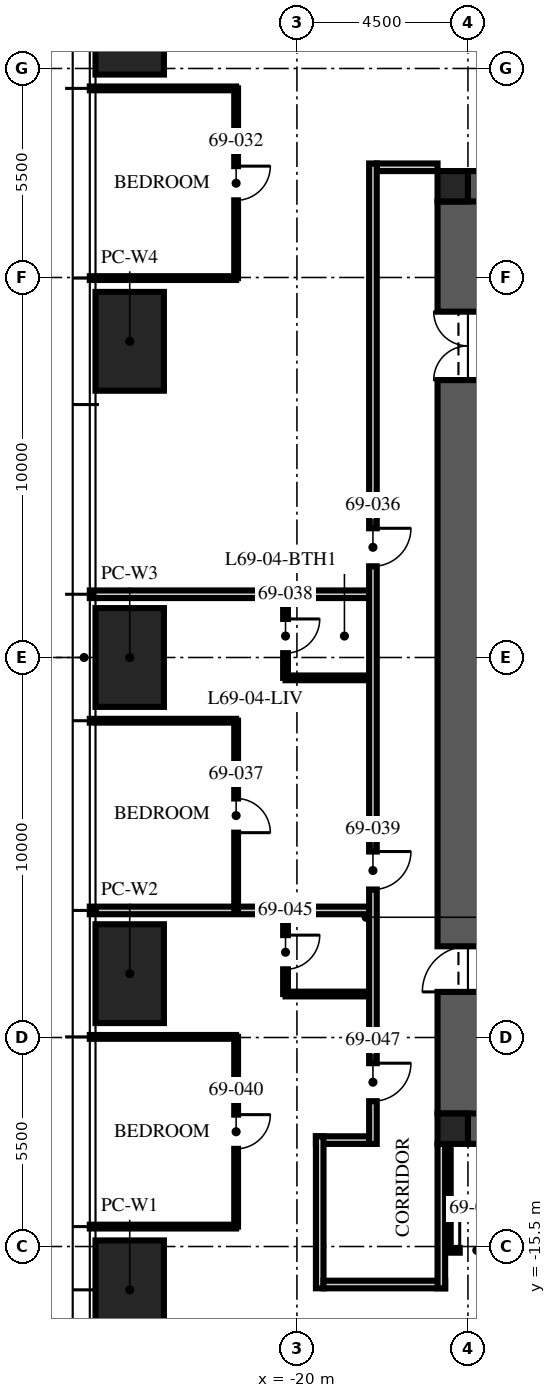
"""IFC4 building model, lengths in metres.
Left out: names, types, materials, properties, quantities, classifications, styles, units other than length and angle.
Written with IfcOpenShell. Run it as: python <this file> out.ifc"""

import sys

from ifc_helpers import new_model, si_unit, direction, frame, frame_2d, origin, origin_2d, place, context, subcontext, project, spatial, rectangle, hollow_rectangle, extrude, element, fill, save


model = new_model("IFC4")
c1 = context("Model", 3, precision=1e-05, world=origin(), true_north=direction((0.0, 1.0)))
c2 = subcontext(c1, "Body", "Model", "MODEL_VIEW")
j1 = project(units=[si_unit("LENGTHUNIT", "METRE"), si_unit("PLANEANGLEUNIT", "RADIAN")], contexts=[c1])
p1 = place(None, origin())
s1 = spatial("IfcSite", under=j1, at=p1, CompositionType="ELEMENT")
p2 = place(p1, origin())
s2 = spatial("IfcBuilding", under=s1, at=p2, CompositionType="ELEMENT")
p3 = place(p2, frame((0.0, 0.0, 274.5)))
s3 = spatial("IfcBuildingStorey", under=s2, at=p3, CompositionType="ELEMENT", Elevation=274.5)
for number, where, z_axis, x_axis in (
    (1, (-15.5, 12.0, -0.25), (0.0, 0.0, 1.0), (1.0, 0.0, 0.0)),
    (2, (-15.5, -12.0, -0.25), (0.0, 0.0, 1.0), (1.0, 0.0, 0.0)),
):
    element("IfcWall", number, at=place(p3, frame(where, z_axis=z_axis, x_axis=x_axis)), inside=s3, PredefinedType="SHEAR", context=c2, shape_type="SweptSolid", body=[
        extrude(rectangle(XDim=31.0, YDim=1.6, at=frame_2d((15.5, 0.0))), origin(), (0.0, 0.0, 1.0), 3.65),
    ])
p4 = place(p3, frame((-15.5, -12.0, -0.25), z_axis=(0.0, 0.0, 1.0), x_axis=(0.0, 1.0, 0.0)))
e3 = element("IfcWall", 3, at=p4, inside=s3, PredefinedType="SHEAR", context=c2, shape_type="SweptSolid", body=[
    extrude(rectangle(XDim=24.0, YDim=1.6, at=frame_2d((12.0, 0.0))), origin(), (0.0, 0.0, 1.0), 3.65),
])
p5 = place(p4, frame((3.2, 0.0, 0.25)))
e4 = element("IfcOpeningElement", 4, at=p5, cuts=e3, PredefinedType="OPENING", context=c2, shape_type="SweptSolid", body=[
    extrude(rectangle(XDim=1.2, YDim=2.1, at=frame_2d((0.6, 1.05))), frame((0.0, 0.81, 0.0), z_axis=(0.0, -1.0, 0.0), x_axis=(1.0, 0.0, 0.0)), (0.0, 0.0, 1.0), 1.62),
])
p6 = place(p4, frame((19.3, 0.0, 0.25)))
e5 = element("IfcOpeningElement", 5, at=p6, cuts=e3, PredefinedType="OPENING", context=c2, shape_type="SweptSolid", body=[
    extrude(rectangle(XDim=1.8, YDim=2.1, at=frame_2d((0.9, 1.05))), frame((0.0, 0.81, 0.0), z_axis=(0.0, -1.0, 0.0), x_axis=(1.0, 0.0, 0.0)), (0.0, 0.0, 1.0), 1.62),
])
for number, where, z_axis, x_axis in (
    (6, (-15.9, 12.4, -0.25), (0.0, 0.0, 1.0), (1.0, 0.0, 0.0)),
    (7, (-15.9, -12.4, -0.25), (0.0, 0.0, 1.0), (1.0, 0.0, 0.0)),
):
    element("IfcColumn", number, at=place(p3, frame(where, z_axis=z_axis, x_axis=x_axis)), inside=s3, PredefinedType="COLUMN", context=c2, shape_type="SweptSolid", body=[
        extrude(rectangle(XDim=0.8, YDim=0.8, at=origin_2d()), origin(), (0.0, 0.0, 1.0), 3.65),
    ])
p7 = place(p3, frame((-24.4, -16.64, 0.0), z_axis=(0.0, 0.0, 1.0), x_axis=(0.0, 1.0, 0.0)))
e8 = element("IfcColumn", 8, at=p7, inside=s3, PredefinedType="COLUMN", context=c2, shape_type="SweptSolid", body=[
    extrude(hollow_rectangle(XDim=2.6, YDim=1.8, WallThickness=0.14, at=origin_2d()), origin(), (0.0, 0.0, 1.0), 2.51),
])
p8 = place(p3, frame((-24.4, -8.32, 0.0), z_axis=(0.0, 0.0, 1.0), x_axis=(0.0, 1.0, 0.0)))
e9 = element("IfcColumn", 9, at=p8, inside=s3, PredefinedType="COLUMN", context=c2, shape_type="SweptSolid", body=[
    extrude(hollow_rectangle(XDim=2.6, YDim=1.8, WallThickness=0.14, at=origin_2d()), origin(), (0.0, 0.0, 1.0), 2.64),
])
p9 = place(p3, frame((-24.4, 0.0, 0.0), z_axis=(0.0, 0.0, 1.0), x_axis=(0.0, 1.0, 0.0)))
e10 = element("IfcColumn", 10, at=p9, inside=s3, PredefinedType="COLUMN", context=c2, shape_type="SweptSolid", body=[
    extrude(hollow_rectangle(XDim=2.6, YDim=1.8, WallThickness=0.14, at=origin_2d()), origin(), (0.0, 0.0, 1.0), 2.78),
])
p10 = place(p3, frame((-24.4, 8.32, 0.0), z_axis=(0.0, 0.0, 1.0), x_axis=(0.0, 1.0, 0.0)))
e11 = element("IfcColumn", 11, at=p10, inside=s3, PredefinedType="COLUMN", context=c2, shape_type="SweptSolid", body=[
    extrude(hollow_rectangle(XDim=2.6, YDim=1.8, WallThickness=0.14, at=origin_2d()), origin(), (0.0, 0.0, 1.0), 2.64),
])
p11 = place(p3, frame((-24.4, 16.64, 0.0), z_axis=(0.0, 0.0, 1.0), x_axis=(0.0, 1.0, 0.0)))
e12 = element("IfcColumn", 12, at=p11, inside=s3, PredefinedType="COLUMN", context=c2, shape_type="SweptSolid", body=[
    extrude(hollow_rectangle(XDim=2.6, YDim=1.8, WallThickness=0.14, at=origin_2d()), origin(), (0.0, 0.0, 1.0), 2.51),
])
p12 = place(p3, frame((-18.1, -12.7, 0.0), z_axis=(0.0, 0.0, 1.0), x_axis=(-1.0, 0.0, 0.0)))
e13 = element("IfcWall", 13, at=p12, inside=s3, PredefinedType="PARTITIONING", context=c2, shape_type="SweptSolid", body=[
    extrude(rectangle(XDim=1.4, YDim=0.2, at=frame_2d((0.7, 0.0))), origin(), (0.0, 0.0, 1.0), 2.2),
])
p13 = place(p3, frame((-19.4, -12.6, 0.0), z_axis=(0.0, 0.0, 1.0), x_axis=(0.0, -1.0, 0.0)))
e14 = element("IfcWall", 14, at=p13, inside=s3, PredefinedType="PARTITIONING", context=c2, shape_type="SweptSolid", body=[
    extrude(rectangle(XDim=4.0, YDim=0.2, at=frame_2d((2.0, 0.0))), origin(), (0.0, 0.0, 1.0), 2.2),
])
p14 = place(p3, frame((-19.3, -16.5, 0.0), z_axis=(0.0, 0.0, 1.0), x_axis=(1.0, 0.0, 0.0)))
e15 = element("IfcWall", 15, at=p14, inside=s3, PredefinedType="PARTITIONING", context=c2, shape_type="SweptSolid", body=[
    extrude(rectangle(XDim=3.2, YDim=0.2, at=frame_2d((1.6, 0.0))), origin(), (0.0, 0.0, 1.0), 2.2),
])
p15 = place(p3, frame((-16.2, -16.6, 0.0), z_axis=(0.0, 0.0, 1.0), x_axis=(0.0, 1.0, 0.0)))
e16 = element("IfcWall", 16, at=p15, inside=s3, PredefinedType="PARTITIONING", context=c2, shape_type="SweptSolid", body=[
    extrude(rectangle(XDim=3.8, YDim=0.2, at=frame_2d((1.9, 0.0))), origin(), (0.0, 0.0, 1.0), 2.2),
])
p16 = place(p3, frame((-16.3, 12.9, 0.0), z_axis=(0.0, 0.0, 1.0), x_axis=(-1.0, 0.0, 0.0)))
e17 = element("IfcWall", 17, at=p16, inside=s3, PredefinedType="PARTITIONING", context=c2, shape_type="SweptSolid", body=[
    extrude(rectangle(XDim=1.6, YDim=0.2, at=frame_2d((0.8, 0.0))), origin(), (0.0, 0.0, 1.0), 2.2),
])
for number, where, z_axis, x_axis in (
    (18, (-21.6, 14.976, 0.0), (0.0, 0.0, 1.0), (-1.0, 0.0, 0.0)),
    (19, (-21.6, 9.984, 0.0), (0.0, 0.0, 1.0), (-1.0, 0.0, 0.0)),
):
    element("IfcWall", number, at=place(p3, frame(where, z_axis=z_axis, x_axis=x_axis)), inside=s3, PredefinedType="PARTITIONING", context=c2, shape_type="SweptSolid", body=[
        extrude(rectangle(XDim=3.85, YDim=0.1, at=frame_2d((1.925, 0.0))), origin(), (0.0, 0.0, 1.0), 2.75),
    ])
p17 = place(p3, frame((-18.1, 1.664, 0.0), z_axis=(0.0, 0.0, 1.0), x_axis=(-1.0, 0.0, 0.0)))
e20 = element("IfcWall", 20, at=p17, inside=s3, PredefinedType="PARTITIONING", context=c2, shape_type="SweptSolid", body=[
    extrude(rectangle(XDim=7.35, YDim=0.2, at=frame_2d((3.675, 0.0))), origin(), (0.0, 0.0, 1.0), 2.75),
])
p18 = place(p3, frame((-21.6, -1.664, 0.0), z_axis=(0.0, 0.0, 1.0), x_axis=(-1.0, 0.0, 0.0)))
e21 = element("IfcWall", 21, at=p18, inside=s3, PredefinedType="PARTITIONING", context=c2, shape_type="SweptSolid", body=[
    extrude(rectangle(XDim=3.85, YDim=0.1, at=frame_2d((1.925, 0.0))), origin(), (0.0, 0.0, 1.0), 2.75),
])
p19 = place(p3, frame((-18.1, -6.656, 0.0), z_axis=(0.0, 0.0, 1.0), x_axis=(-1.0, 0.0, 0.0)))
e22 = element("IfcWall", 22, at=p19, inside=s3, PredefinedType="PARTITIONING", context=c2, shape_type="SweptSolid", body=[
    extrude(rectangle(XDim=7.35, YDim=0.2, at=frame_2d((3.675, 0.0))), origin(), (0.0, 0.0, 1.0), 2.75),
])
for number, where, z_axis, x_axis in (
    (23, (-21.6, -9.984, 0.0), (0.0, 0.0, 1.0), (-1.0, 0.0, 0.0)),
    (24, (-21.6, -14.976, 0.0), (0.0, 0.0, 1.0), (-1.0, 0.0, 0.0)),
):
    element("IfcWall", number, at=place(p3, frame(where, z_axis=z_axis, x_axis=x_axis)), inside=s3, PredefinedType="PARTITIONING", context=c2, shape_type="SweptSolid", body=[
        extrude(rectangle(XDim=3.85, YDim=0.1, at=frame_2d((1.925, 0.0))), origin(), (0.0, 0.0, 1.0), 2.75),
    ])
p20 = place(p3, frame((-21.6, 14.976, 0.0), z_axis=(0.0, 0.0, 1.0), x_axis=(0.0, -1.0, 0.0)))
e25 = element("IfcWall", 25, at=p20, inside=s3, PredefinedType="PARTITIONING", context=c2, shape_type="SweptSolid", body=[
    extrude(rectangle(XDim=4.992, YDim=0.1, at=frame_2d((2.496, 0.0))), origin(), (0.0, 0.0, 1.0), 2.2),
])
p21 = place(p20, frame((2.046, 0.0, 0.0)))
e26 = element("IfcOpeningElement", 26, at=p21, cuts=e25, PredefinedType="OPENING", context=c2, shape_type="SweptSolid", body=[
    extrude(rectangle(XDim=0.9, YDim=2.1, at=frame_2d((0.45, 1.05))), frame((0.0, 0.06, 0.0), z_axis=(0.0, -1.0, 0.0), x_axis=(1.0, 0.0, 0.0)), (0.0, 0.0, 1.0), 0.12),
])
p22 = place(p3, frame((-21.6, -1.664, 0.0), z_axis=(0.0, 0.0, 1.0), x_axis=(0.0, -1.0, 0.0)))
e27 = element("IfcWall", 27, at=p22, inside=s3, PredefinedType="PARTITIONING", context=c2, shape_type="SweptSolid", body=[
    extrude(rectangle(XDim=4.992, YDim=0.1, at=frame_2d((2.496, 0.0))), origin(), (0.0, 0.0, 1.0), 2.2),
])
p23 = place(p22, frame((2.046, 0.0, 0.0)))
e28 = element("IfcOpeningElement", 28, at=p23, cuts=e27, PredefinedType="OPENING", context=c2, shape_type="SweptSolid", body=[
    extrude(rectangle(XDim=0.9, YDim=2.1, at=frame_2d((0.45, 1.05))), frame((0.0, 0.06, 0.0), z_axis=(0.0, -1.0, 0.0), x_axis=(1.0, 0.0, 0.0)), (0.0, 0.0, 1.0), 0.12),
])
p24 = place(p3, frame((-20.3, 1.664, 0.0), z_axis=(0.0, 0.0, 1.0), x_axis=(0.0, -1.0, 0.0)))
e29 = element("IfcWall", 29, at=p24, inside=s3, PredefinedType="PARTITIONING", context=c2, shape_type="SweptSolid", body=[
    extrude(rectangle(XDim=2.2, YDim=0.125, at=frame_2d((1.1, 0.0))), origin(), (0.0, 0.0, 1.0), 2.2),
])
p25 = place(p24, frame((0.65, 0.0, 0.0)))
e30 = element("IfcOpeningElement", 30, at=p25, cuts=e29, PredefinedType="OPENING", context=c2, shape_type="SweptSolid", body=[
    extrude(rectangle(XDim=0.9, YDim=2.1, at=frame_2d((0.45, 1.05))), frame((0.0, 0.073, 0.0), z_axis=(0.0, -1.0, 0.0), x_axis=(1.0, 0.0, 0.0)), (0.0, 0.0, 1.0), 0.145),
])
p26 = place(p3, frame((-18.1, -0.536, 0.0), z_axis=(0.0, 0.0, 1.0), x_axis=(-1.0, 0.0, 0.0)))
e31 = element("IfcWall", 31, at=p26, inside=s3, PredefinedType="PARTITIONING", context=c2, shape_type="SweptSolid", body=[
    extrude(rectangle(XDim=2.2, YDim=0.125, at=frame_2d((1.1, 0.0))), origin(), (0.0, 0.0, 1.0), 2.2),
])
p27 = place(p3, frame((-21.6, -9.984, 0.0), z_axis=(0.0, 0.0, 1.0), x_axis=(0.0, -1.0, 0.0)))
e32 = element("IfcWall", 32, at=p27, inside=s3, PredefinedType="PARTITIONING", context=c2, shape_type="SweptSolid", body=[
    extrude(rectangle(XDim=4.992, YDim=0.1, at=frame_2d((2.496, 0.0))), origin(), (0.0, 0.0, 1.0), 2.2),
])
p28 = place(p27, frame((2.046, 0.0, 0.0)))
e33 = element("IfcOpeningElement", 33, at=p28, cuts=e32, PredefinedType="OPENING", context=c2, shape_type="SweptSolid", body=[
    extrude(rectangle(XDim=0.9, YDim=2.1, at=frame_2d((0.45, 1.05))), frame((0.0, 0.06, 0.0), z_axis=(0.0, -1.0, 0.0), x_axis=(1.0, 0.0, 0.0)), (0.0, 0.0, 1.0), 0.12),
])
p29 = place(p3, frame((-20.3, -6.656, 0.0), z_axis=(0.0, 0.0, 1.0), x_axis=(0.0, -1.0, 0.0)))
e34 = element("IfcWall", 34, at=p29, inside=s3, PredefinedType="PARTITIONING", context=c2, shape_type="SweptSolid", body=[
    extrude(rectangle(XDim=2.2, YDim=0.125, at=frame_2d((1.1, 0.0))), origin(), (0.0, 0.0, 1.0), 2.2),
])
p30 = place(p29, frame((0.65, 0.0, 0.0)))
e35 = element("IfcOpeningElement", 35, at=p30, cuts=e34, PredefinedType="OPENING", context=c2, shape_type="SweptSolid", body=[
    extrude(rectangle(XDim=0.9, YDim=2.1, at=frame_2d((0.45, 1.05))), frame((0.0, 0.073, 0.0), z_axis=(0.0, -1.0, 0.0), x_axis=(1.0, 0.0, 0.0)), (0.0, 0.0, 1.0), 0.145),
])
p31 = place(p3, frame((-18.1, -8.856, 0.0), z_axis=(0.0, 0.0, 1.0), x_axis=(-1.0, 0.0, 0.0)))
e36 = element("IfcWall", 36, at=p31, inside=s3, PredefinedType="PARTITIONING", context=c2, shape_type="SweptSolid", body=[
    extrude(rectangle(XDim=2.2, YDim=0.125, at=frame_2d((1.1, 0.0))), origin(), (0.0, 0.0, 1.0), 2.4),
])
p32 = place(p3, frame((-16.017, -15.6, 0.0), z_axis=(0.0, 0.0, 1.0), x_axis=(1.0, 0.0, 0.0)))
e37 = element("IfcWall", 37, at=p32, inside=s3, PredefinedType="PARTITIONING", context=c2, shape_type="SweptSolid", body=[
    extrude(rectangle(XDim=1.5, YDim=0.125, at=frame_2d((0.75, 0.0))), origin(), (0.0, 0.0, 1.0), 3.4),
])
p33 = place(p32, frame((0.3, 0.0, 0.0)))
e38 = element("IfcOpeningElement", 38, at=p33, cuts=e37, PredefinedType="OPENING", context=c2, shape_type="SweptSolid", body=[
    extrude(rectangle(XDim=0.9, YDim=2.1, at=frame_2d((0.45, 1.05))), frame((0.0, 0.073, 0.0), z_axis=(0.0, -1.0, 0.0), x_axis=(1.0, 0.0, 0.0)), (0.0, 0.0, 1.0), 0.145),
])
p34 = place(p3, frame((-16.017, -12.8, 0.0), z_axis=(0.0, 0.0, 1.0), x_axis=(0.0, -1.0, 0.0)))
e39 = element("IfcWall", 39, at=p34, inside=s3, PredefinedType="PARTITIONING", context=c2, shape_type="SweptSolid", body=[
    extrude(rectangle(XDim=2.8, YDim=0.125, at=frame_2d((1.4, 0.0))), origin(), (0.0, 0.0, 1.0), 2.2),
])
p35 = place(p3, frame((-18.0, 13.0, 0.0), z_axis=(0.0, 0.0, 1.0), x_axis=(0.0, -1.0, 0.0)))
e40 = element("IfcWall", 40, at=p35, inside=s3, PredefinedType="PARTITIONING", context=c2, shape_type="SweptSolid", body=[
    extrude(rectangle(XDim=25.8, YDim=0.2, at=frame_2d((12.9, 0.0))), origin(), (0.0, 0.0, 1.0), 2.2),
])
p36 = place(p35, frame((9.6, 0.0, 0.0)))
e41 = element("IfcOpeningElement", 41, at=p36, cuts=e40, PredefinedType="OPENING", context=c2, shape_type="SweptSolid", body=[
    extrude(rectangle(XDim=1.0, YDim=2.2, at=frame_2d((0.5, 1.1))), frame((0.0, 0.11, 0.0), z_axis=(0.0, -1.0, 0.0), x_axis=(1.0, 0.0, 0.0)), (0.0, 0.0, 1.0), 0.22),
])
p37 = place(p35, frame((18.106, 0.0, 0.0)))
e42 = element("IfcOpeningElement", 42, at=p37, cuts=e40, PredefinedType="OPENING", context=c2, shape_type="SweptSolid", body=[
    extrude(rectangle(XDim=1.0, YDim=2.2, at=frame_2d((0.5, 1.1))), frame((0.0, 0.11, 0.0), z_axis=(0.0, -1.0, 0.0), x_axis=(1.0, 0.0, 0.0)), (0.0, 0.0, 1.0), 0.22),
])
p38 = place(p35, frame((23.676, 0.0, 0.0)))
e43 = element("IfcOpeningElement", 43, at=p38, cuts=e40, PredefinedType="OPENING", context=c2, shape_type="SweptSolid", body=[
    extrude(rectangle(XDim=1.0, YDim=2.2, at=frame_2d((0.5, 1.1))), frame((0.0, 0.11, 0.0), z_axis=(0.0, -1.0, 0.0), x_axis=(1.0, 0.0, 0.0)), (0.0, 0.0, 1.0), 0.22),
])
p39 = place(p5, origin())
e44 = element("IfcDoor", 44, at=p39, inside=s3, OperationType="SINGLE_SWING_LEFT", PredefinedType="DOOR", context=c2, shape_type="SweptSolid", body=[
    extrude(rectangle(XDim=1.2, YDim=2.1, at=frame_2d((0.6, 1.05))), frame((0.0, 0.025, 0.0), z_axis=(0.0, -1.0, 0.0), x_axis=(1.0, 0.0, 0.0)), (0.0, 0.0, 1.0), 0.05),
])
fill(e4, e44)
p40 = place(p6, origin())
e45 = element("IfcDoor", 45, at=p40, inside=s3, OperationType="DOUBLE_DOOR_SINGLE_SWING", PredefinedType="DOOR", context=c2, shape_type="SweptSolid", body=[
    extrude(rectangle(XDim=1.8, YDim=2.1, at=frame_2d((0.9, 1.05))), frame((0.0, 0.025, 0.0), z_axis=(0.0, -1.0, 0.0), x_axis=(1.0, 0.0, 0.0)), (0.0, 0.0, 1.0), 0.05),
])
fill(e5, e45)
p41 = place(p21, origin())
e46 = element("IfcDoor", 46, at=p41, inside=s3, OperationType="SINGLE_SWING_LEFT", PredefinedType="DOOR", context=c2, shape_type="SweptSolid", body=[
    extrude(rectangle(XDim=0.9, YDim=2.1, at=frame_2d((0.45, 1.05))), frame((0.0, 0.025, 0.0), z_axis=(0.0, -1.0, 0.0), x_axis=(1.0, 0.0, 0.0)), (0.0, 0.0, 1.0), 0.05),
])
fill(e26, e46)
p42 = place(p36, origin())
e47 = element("IfcDoor", 47, at=p42, inside=s3, OperationType="SINGLE_SWING_LEFT", PredefinedType="DOOR", context=c2, shape_type="SweptSolid", body=[
    extrude(rectangle(XDim=1.0, YDim=2.2, at=frame_2d((0.5, 1.1))), frame((0.0, 0.025, 0.0), z_axis=(0.0, -1.0, 0.0), x_axis=(1.0, 0.0, 0.0)), (0.0, 0.0, 1.0), 0.05),
])
fill(e41, e47)
p43 = place(p23, origin())
e48 = element("IfcDoor", 48, at=p43, inside=s3, OperationType="SINGLE_SWING_RIGHT", PredefinedType="DOOR", context=c2, shape_type="SweptSolid", body=[
    extrude(rectangle(XDim=0.9, YDim=2.1, at=frame_2d((0.45, 1.05))), frame((0.0, 0.025, 0.0), z_axis=(0.0, -1.0, 0.0), x_axis=(1.0, 0.0, 0.0)), (0.0, 0.0, 1.0), 0.05),
])
fill(e28, e48)
p44 = place(p25, origin())
e49 = element("IfcDoor", 49, at=p44, inside=s3, OperationType="SINGLE_SWING_LEFT", PredefinedType="DOOR", context=c2, shape_type="SweptSolid", body=[
    extrude(rectangle(XDim=0.9, YDim=2.1, at=frame_2d((0.45, 1.05))), frame((0.0, 0.025, 0.0), z_axis=(0.0, -1.0, 0.0), x_axis=(1.0, 0.0, 0.0)), (0.0, 0.0, 1.0), 0.05),
])
fill(e30, e49)
p45 = place(p37, origin())
e50 = element("IfcDoor", 50, at=p45, inside=s3, OperationType="SINGLE_SWING_LEFT", PredefinedType="DOOR", context=c2, shape_type="SweptSolid", body=[
    extrude(rectangle(XDim=1.0, YDim=2.2, at=frame_2d((0.5, 1.1))), frame((0.0, 0.025, 0.0), z_axis=(0.0, -1.0, 0.0), x_axis=(1.0, 0.0, 0.0)), (0.0, 0.0, 1.0), 0.05),
])
fill(e42, e50)
p46 = place(p28, origin())
e51 = element("IfcDoor", 51, at=p46, inside=s3, OperationType="SINGLE_SWING_LEFT", PredefinedType="DOOR", context=c2, shape_type="SweptSolid", body=[
    extrude(rectangle(XDim=0.9, YDim=2.1, at=frame_2d((0.45, 1.05))), frame((0.0, 0.025, 0.0), z_axis=(0.0, -1.0, 0.0), x_axis=(1.0, 0.0, 0.0)), (0.0, 0.0, 1.0), 0.05),
])
fill(e33, e51)
p47 = place(p30, origin())
e52 = element("IfcDoor", 52, at=p47, inside=s3, OperationType="SINGLE_SWING_LEFT", PredefinedType="DOOR", context=c2, shape_type="SweptSolid", body=[
    extrude(rectangle(XDim=0.9, YDim=2.1, at=frame_2d((0.45, 1.05))), frame((0.0, 0.025, 0.0), z_axis=(0.0, -1.0, 0.0), x_axis=(1.0, 0.0, 0.0)), (0.0, 0.0, 1.0), 0.05),
])
fill(e35, e52)
p48 = place(p33, origin())
e53 = element("IfcDoor", 53, at=p48, inside=s3, OperationType="SINGLE_SWING_LEFT", PredefinedType="DOOR", context=c2, shape_type="SweptSolid", body=[
    extrude(rectangle(XDim=0.9, YDim=2.1, at=frame_2d((0.45, 1.05))), frame((0.0, 0.025, 0.0), z_axis=(0.0, -1.0, 0.0), x_axis=(1.0, 0.0, 0.0)), (0.0, 0.0, 1.0), 0.05),
])
fill(e38, e53)
p49 = place(p38, origin())
e54 = element("IfcDoor", 54, at=p49, inside=s3, OperationType="SINGLE_SWING_LEFT", PredefinedType="DOOR", context=c2, shape_type="SweptSolid", body=[
    extrude(rectangle(XDim=1.0, YDim=2.2, at=frame_2d((0.5, 1.1))), frame((0.0, 0.025, 0.0), z_axis=(0.0, -1.0, 0.0), x_axis=(1.0, 0.0, 0.0)), (0.0, 0.0, 1.0), 0.05),
])
fill(e43, e54)
save(model, sys.argv[1])
